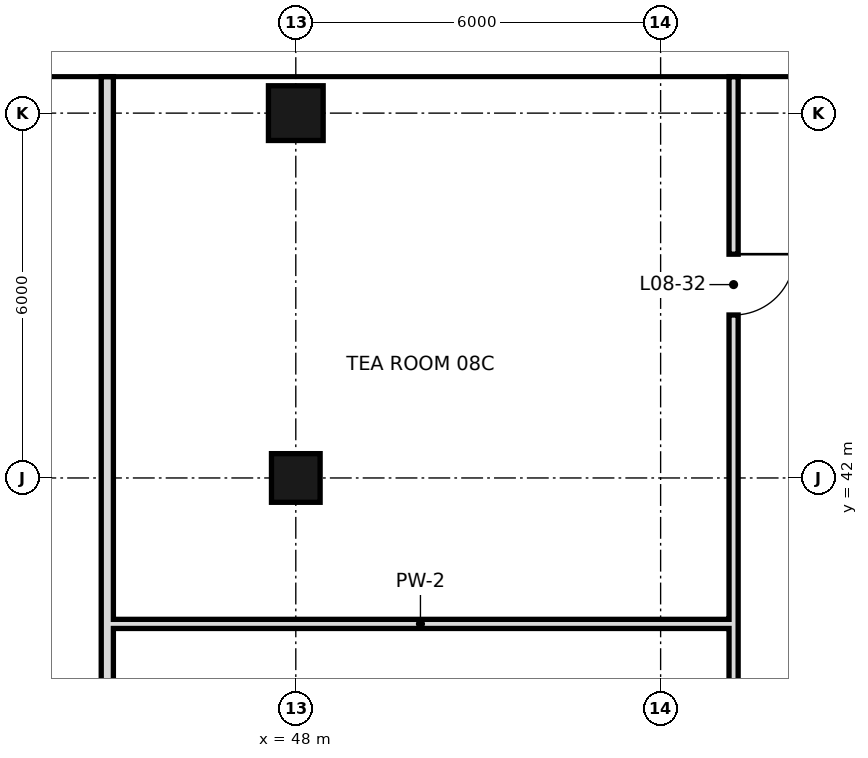
"""IFC4 building model, lengths in metres.
Left out: names, types, materials, properties, quantities, classifications, styles, units other than length and angle.
Written with IfcOpenShell. Run it as: python <this file> out.ifc"""

import sys

from ifc_helpers import new_model, si_unit, direction, frame, frame_2d, origin, origin_2d, place, context, subcontext, project, spatial, rectangle, hollow_rectangle, extrude, element, fill, save


model = new_model("IFC4")
c1 = context("Model", 3, precision=1e-05, world=origin(), true_north=direction((0.0, 1.0)))
c2 = subcontext(c1, "Body", "Model", "MODEL_VIEW")
j1 = project(units=[si_unit("LENGTHUNIT", "METRE"), si_unit("PLANEANGLEUNIT", "RADIAN")], contexts=[c1])
p1 = place(None, origin())
s1 = spatial("IfcSite", under=j1, at=p1, CompositionType="ELEMENT")
p2 = place(p1, origin())
s2 = spatial("IfcBuilding", under=s1, at=p2, CompositionType="ELEMENT")
p3 = place(p2, frame((0.0, 0.0, 49.8)))
s3 = spatial("IfcBuildingStorey", under=s2, at=p3, CompositionType="ELEMENT", Elevation=49.8)
p4 = place(p3, frame((48.0, 42.0, 0.0), z_axis=(0.0, 0.0, 1.0), x_axis=(1.0, 0.0, 0.0)))
e1 = element("IfcColumn", 1, at=p4, inside=s3, PredefinedType="COLUMN", context=c2, shape_type="SweptSolid", body=[
    extrude(hollow_rectangle(XDim=0.8, YDim=0.8, WallThickness=0.04, at=origin_2d()), origin(), (0.0, 0.0, 1.0), 3.6),
])
p5 = place(p3, frame((48.0, 48.0, 0.0), z_axis=(0.0, 0.0, 1.0), x_axis=(1.0, 0.0, 0.0)))
e2 = element("IfcColumn", 2, at=p5, inside=s3, PredefinedType="COLUMN", context=c2, shape_type="SweptSolid", body=[
    extrude(hollow_rectangle(XDim=0.9, YDim=0.9, WallThickness=0.045, at=origin_2d()), origin(), (0.0, 0.0, 1.0), 3.6),
])
p6 = place(p3, frame((44.9, 21.6, 0.0), z_axis=(0.0, 0.0, 1.0), x_axis=(0.0, 1.0, 0.0)))
e3 = element("IfcWall", 3, at=p6, inside=s3, PredefinedType="SOLIDWALL", context=c2, shape_type="SweptSolid", body=[
    extrude(rectangle(XDim=27.0, YDim=0.2, at=frame_2d((13.5, 0.0))), origin(), (0.0, 0.0, 1.0), 2.72),
])
p7 = place(p6, frame((15.0, 0.0, 0.0)))
e4 = element("IfcOpeningElement", 4, at=p7, cuts=e3, PredefinedType="OPENING", context=c2, shape_type="SweptSolid", body=[
    extrude(rectangle(XDim=1.2, YDim=2.4, at=frame_2d((0.6, 1.2))), frame((0.0, 0.11, 0.0), z_axis=(0.0, -1.0, 0.0), x_axis=(1.0, 0.0, 0.0)), (0.0, 0.0, 1.0), 0.22),
])
p8 = place(p3, frame((55.2, 24.0, 0.0), z_axis=(0.0, 0.0, 1.0), x_axis=(0.0, 1.0, 0.0)))
e5 = element("IfcWall", 5, at=p8, inside=s3, PredefinedType="PARTITIONING", context=c2, shape_type="SweptSolid", body=[
    extrude(rectangle(XDim=24.6, YDim=0.15, at=frame_2d((12.3, 0.0))), origin(), (0.0, 0.0, 1.0), 3.42),
])
p9 = place(p8, frame((12.7, 0.0, 0.0)))
e6 = element("IfcOpeningElement", 6, at=p9, cuts=e5, PredefinedType="OPENING", context=c2, shape_type="SweptSolid", body=[
    extrude(rectangle(XDim=1.0, YDim=2.4, at=frame_2d((0.5, 1.2))), frame((0.0, 0.085, 0.0), z_axis=(0.0, -1.0, 0.0), x_axis=(1.0, 0.0, 0.0)), (0.0, 0.0, 1.0), 0.17),
])
p10 = place(p8, frame((6.76, 0.0, 0.0)))
e7 = element("IfcOpeningElement", 7, at=p10, cuts=e5, PredefinedType="OPENING", context=c2, shape_type="SweptSolid", body=[
    extrude(rectangle(XDim=1.0, YDim=2.4, at=frame_2d((0.5, 1.2))), frame((0.0, 0.085, 0.0), z_axis=(0.0, -1.0, 0.0), x_axis=(1.0, 0.0, 0.0)), (0.0, 0.0, 1.0), 0.17),
])
p11 = place(p8, frame((20.68, 0.0, 0.0)))
e8 = element("IfcOpeningElement", 8, at=p11, cuts=e5, PredefinedType="OPENING", context=c2, shape_type="SweptSolid", body=[
    extrude(rectangle(XDim=1.0, YDim=2.4, at=frame_2d((0.5, 1.2))), frame((0.0, 0.085, 0.0), z_axis=(0.0, -1.0, 0.0), x_axis=(1.0, 0.0, 0.0)), (0.0, 0.0, 1.0), 0.17),
])
p12 = place(p3, frame((44.9, 39.6, 0.0), z_axis=(0.0, 0.0, 1.0), x_axis=(1.0, 0.0, 0.0)))
e9 = element("IfcWall", 9, at=p12, inside=s3, PredefinedType="PARTITIONING", context=c2, shape_type="SweptSolid", body=[
    extrude(rectangle(XDim=10.3, YDim=0.15, at=frame_2d((5.15, 0.0))), origin(), (0.0, 0.0, 1.0), 3.42),
])
p13 = place(p11, origin())
e10 = element("IfcDoor", 10, at=p13, inside=s3, OperationType="SINGLE_SWING_RIGHT", PredefinedType="DOOR", context=c2, shape_type="SweptSolid", body=[
    extrude(rectangle(XDim=1.0, YDim=2.4, at=frame_2d((0.5, 1.2))), frame((0.0, 0.025, 0.0), z_axis=(0.0, -1.0, 0.0), x_axis=(1.0, 0.0, 0.0)), (0.0, 0.0, 1.0), 0.05),
])
fill(e8, e10)
save(model, sys.argv[1])
